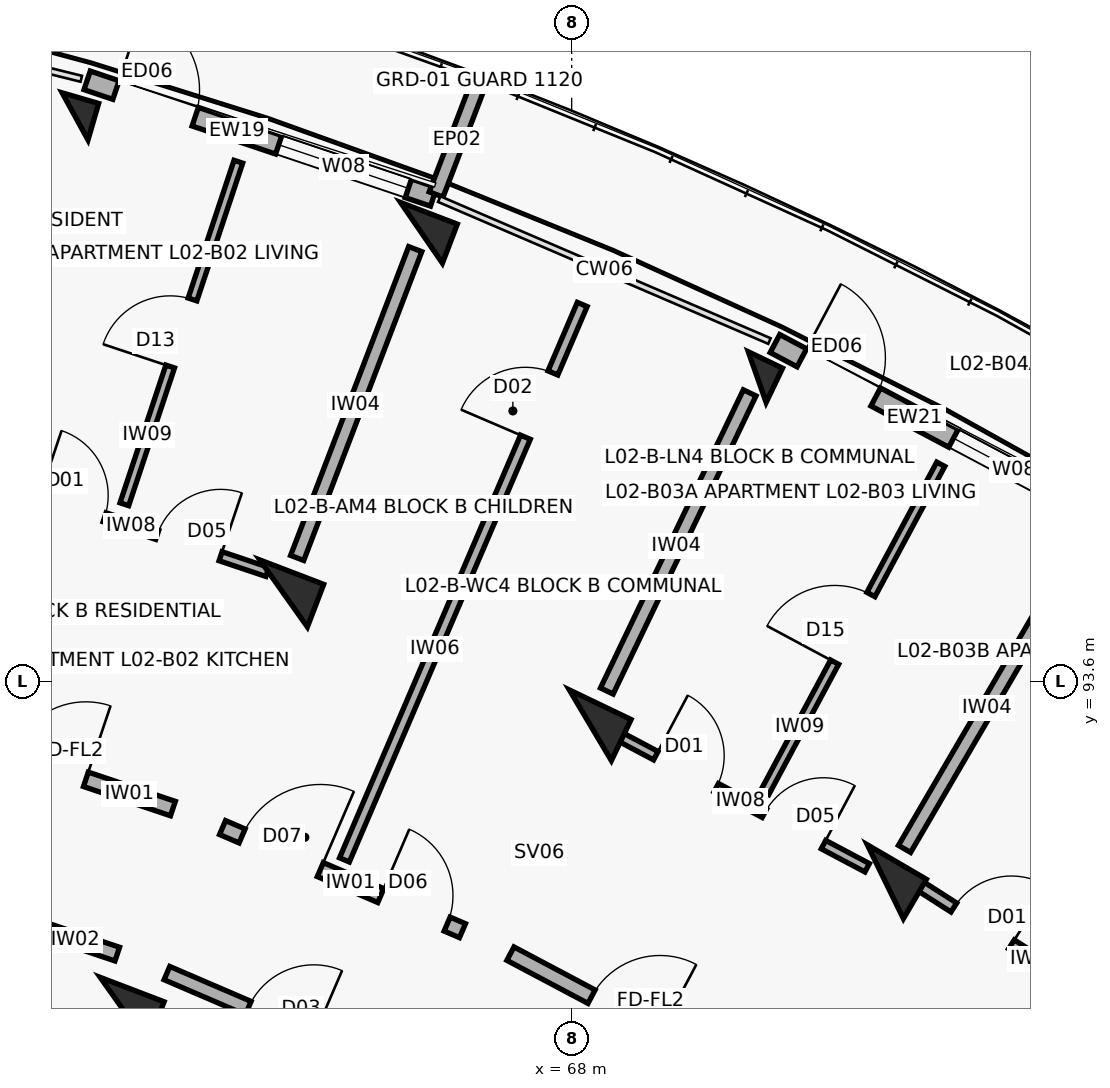
"""IFC4 building model, lengths in metres.
Left out: names, types, materials, properties, quantities, classifications, styles, units other than length and angle.
Written with IfcOpenShell. Run it as: python <this file> out.ifc"""

import sys

from ifc_helpers import new_model, si_unit, direction, frame, frame_2d, origin, origin_2d, place, context, subcontext, project, spatial, rectangle, extrude, element, fill, save


model = new_model("IFC4")
c1 = context("Model", 3, precision=1e-05, world=origin(), true_north=direction((0.0, 1.0)))
c2 = subcontext(c1, "Body", "Model", "MODEL_VIEW")
j1 = project(units=[si_unit("LENGTHUNIT", "METRE"), si_unit("PLANEANGLEUNIT", "RADIAN")], contexts=[c1])
p1 = place(None, origin())
s1 = spatial("IfcSite", under=j1, at=p1, CompositionType="ELEMENT")
p2 = place(p1, origin())
s2 = spatial("IfcBuilding", under=s1, at=p2, CompositionType="ELEMENT")
p3 = place(p2, frame((0.0, 0.0, 8.1)))
s3 = spatial("IfcBuildingStorey", under=s2, at=p3, CompositionType="ELEMENT", Elevation=8.1)
p4 = place(p3, frame((61.467, 101.031, 0.0), z_axis=(0.0, 0.0, 1.0), x_axis=(0.27966144946, 0.96009867914, 0.0)))
e1 = element("IfcColumn", 1, at=p4, inside=s3, PredefinedType="COLUMN", context=c2, shape_type="SweptSolid", body=[
    extrude(rectangle(XDim=0.5, YDim=0.5, at=origin_2d()), origin(), (0.0, 0.0, 1.0), 3.1),
])
for number, where, z_axis, x_axis in (
    (2, (62.111, 89.261, 0.0), (0.0, 0.0, 1.0), (0.357, 0.934, 0.0)),
    (3, (64.21, 94.753, 0.0), (0.0, 0.0, 1.0), (0.357, 0.934, 0.0)),
):
    element("IfcColumn", number, at=place(p3, frame(where, z_axis=z_axis, x_axis=x_axis)), inside=s3, PredefinedType="COLUMN", context=c2, shape_type="SweptSolid", body=[
        extrude(rectangle(XDim=0.6, YDim=0.9, at=origin_2d()), origin(), (0.0, 0.0, 1.0), 3.1),
    ])
p5 = place(p3, frame((66.024, 99.499, 0.0), z_axis=(0.0, 0.0, 1.0), x_axis=(0.357064076459, 0.934079892355, 0.0)))
e4 = element("IfcColumn", 4, at=p5, inside=s3, PredefinedType="COLUMN", context=c2, shape_type="SweptSolid", body=[
    extrude(rectangle(XDim=0.55, YDim=0.8, at=origin_2d()), origin(), (0.0, 0.0, 1.0), 3.1),
])
p6 = place(p3, frame((68.246, 93.019, 0.0), z_axis=(0.0, 0.0, 1.0), x_axis=(0.432085748802, 0.901832526405, 0.0)))
e5 = element("IfcColumn", 5, at=p6, inside=s3, PredefinedType="COLUMN", context=c2, shape_type="SweptSolid", body=[
    extrude(rectangle(XDim=0.6, YDim=0.9, at=origin_2d()), origin(), (0.0, 0.0, 1.0), 3.1),
])
p7 = place(p3, frame((70.441, 97.6, 0.0), z_axis=(0.0, 0.0, 1.0), x_axis=(0.432085748802, 0.901832526405, 0.0)))
e6 = element("IfcColumn", 6, at=p7, inside=s3, PredefinedType="COLUMN", context=c2, shape_type="SweptSolid", body=[
    extrude(rectangle(XDim=0.5, YDim=0.5, at=origin_2d()), origin(), (0.0, 0.0, 1.0), 3.1),
])
p8 = place(p3, frame((72.127, 90.96, 0.0), z_axis=(0.0, 0.0, 1.0), x_axis=(0.504226211181, 0.863571611366, 0.0)))
e7 = element("IfcColumn", 7, at=p8, inside=s3, PredefinedType="COLUMN", context=c2, shape_type="SweptSolid", body=[
    extrude(rectangle(XDim=0.6, YDim=0.9, at=origin_2d()), origin(), (0.0, 0.0, 1.0), 3.1),
])
p9 = place(p3, frame((61.625, 101.504, 0.0), z_axis=(0.0, 0.0, 1.0), x_axis=(0.947867898788, -0.318663531717, 0.0)))
e8 = element("IfcWall", 8, at=p9, inside=s3, PredefinedType="SOLIDWALL", context=c2, shape_type="SweptSolid", body=[
    extrude(rectangle(XDim=4.809, YDim=0.258, at=frame_2d((2.405, 0.0))), origin(), (0.0, 0.0, 1.0), 2.25),
])
p10 = place(p9, frame((0.4, 0.0, 0.0)))
e9 = element("IfcOpeningElement", 9, at=p10, cuts=e8, PredefinedType="OPENING", context=c2, shape_type="SweptSolid", body=[
    extrude(rectangle(XDim=1.1, YDim=2.15, at=frame_2d((0.55, 1.075))), frame((0.0, 0.139, 0.0), z_axis=(0.0, -1.0, 0.0), x_axis=(1.0, 0.0, 0.0)), (0.0, 0.0, 1.0), 0.278),
])
p11 = place(p9, frame((2.659, 0.0, 0.35)))
e10 = element("IfcOpeningElement", 10, at=p11, cuts=e8, PredefinedType="OPENING", context=c2, shape_type="SweptSolid", body=[
    extrude(rectangle(XDim=1.8, YDim=1.65, at=frame_2d((0.9, 0.825))), frame((0.0, 0.139, 0.0), z_axis=(0.0, -1.0, 0.0), x_axis=(1.0, 0.0, 0.0)), (0.0, 0.0, 1.0), 0.278),
])
p12 = place(p3, frame((66.217, 100.003, 0.0), z_axis=(0.0, 0.0, 1.0), x_axis=(0.356957296461, 0.934120703391, 0.0)))
e11 = element("IfcWall", 11, at=p12, inside=s3, PredefinedType="PARAPET", context=c2, shape_type="SweptSolid", body=[
    extrude(rectangle(XDim=1.53, YDim=0.195, at=frame_2d((0.765, 0.0))), origin(), (0.0, 0.0, 1.0), 2.25),
])
p13 = place(p3, frame((70.675, 98.042, 0.0), z_axis=(0.0, 0.0, 1.0), x_axis=(0.883448093208, -0.468529045639, 0.0)))
e12 = element("IfcWall", 12, at=p13, inside=s3, PredefinedType="SOLIDWALL", context=c2, shape_type="SweptSolid", body=[
    extrude(rectangle(XDim=4.809, YDim=0.268, at=frame_2d((2.405, 0.0))), origin(), (0.0, 0.0, 1.0), 2.25),
])
p14 = place(p13, frame((0.4, 0.0, 0.0)))
e13 = element("IfcOpeningElement", 13, at=p14, cuts=e12, PredefinedType="OPENING", context=c2, shape_type="SweptSolid", body=[
    extrude(rectangle(XDim=1.1, YDim=2.15, at=frame_2d((0.55, 1.075))), frame((0.0, 0.144, 0.0), z_axis=(0.0, -1.0, 0.0), x_axis=(1.0, 0.0, 0.0)), (0.0, 0.0, 1.0), 0.288),
])
p15 = place(p13, frame((2.659, 0.0, 0.35)))
e14 = element("IfcOpeningElement", 14, at=p15, cuts=e12, PredefinedType="OPENING", context=c2, shape_type="SweptSolid", body=[
    extrude(rectangle(XDim=1.8, YDim=1.65, at=frame_2d((0.9, 0.825))), frame((0.0, 0.144, 0.0), z_axis=(0.0, -1.0, 0.0), x_axis=(1.0, 0.0, 0.0)), (0.0, 0.0, 1.0), 0.288),
])
p16 = place(p3, frame((59.497, 93.018, 0.0), z_axis=(0.0, 0.0, 1.0), x_axis=(0.947863007629, -0.318678080151, 0.0)))
e15 = element("IfcWall", 15, at=p16, inside=s3, PredefinedType="SOLIDWALL", context=c2, shape_type="SweptSolid", body=[
    extrude(rectangle(XDim=3.436, YDim=0.2, at=frame_2d((1.718, 0.0))), origin(), (0.0, 0.0, 1.0), 2.08),
])
p17 = place(p16, frame((1.208, 0.0, 0.0)))
e16 = element("IfcOpeningElement", 16, at=p17, cuts=e15, PredefinedType="OPENING", context=c2, shape_type="SweptSolid", body=[
    extrude(rectangle(XDim=1.02, YDim=2.15, at=frame_2d((0.51, 1.075))), frame((0.0, 0.11, 0.0), z_axis=(0.0, -1.0, 0.0), x_axis=(1.0, 0.0, 0.0)), (0.0, 0.0, 1.0), 0.22),
])
p18 = place(p3, frame((58.923, 91.049, 0.0), z_axis=(0.0, 0.0, 1.0), x_axis=(0.94787351033, -0.318646839643, 0.0)))
e17 = element("IfcWall", 17, at=p18, inside=s3, PredefinedType="SOLIDWALL", context=c2, shape_type="SweptSolid", body=[
    extrude(rectangle(XDim=3.269, YDim=0.19, at=frame_2d((1.634, 0.0))), origin(), (0.0, 0.0, 1.0), 2.08),
])
p19 = place(p18, frame((1.174, 0.0, 0.0)))
e18 = element("IfcOpeningElement", 18, at=p19, cuts=e17, PredefinedType="OPENING", context=c2, shape_type="SweptSolid", body=[
    extrude(rectangle(XDim=0.92, YDim=2.1, at=frame_2d((0.46, 1.05))), frame((0.0, 0.105, 0.0), z_axis=(0.0, -1.0, 0.0), x_axis=(1.0, 0.0, 0.0)), (0.0, 0.0, 1.0), 0.21),
])
p20 = place(p3, frame((60.386, 96.25, 0.0), z_axis=(0.0, 0.0, 1.0), x_axis=(0.947879193428, -0.318629933725, 0.0)))
e19 = element("IfcWall", 19, at=p20, inside=s3, PredefinedType="PARTITIONING", context=c2, shape_type="SweptSolid", body=[
    extrude(rectangle(XDim=3.81, YDim=0.125, at=frame_2d((1.905, 0.0))), origin(), (0.0, 0.0, 1.0), 2.08),
])
p21 = place(p20, frame((0.65, 0.0, 0.0)))
e20 = element("IfcOpeningElement", 20, at=p21, cuts=e19, PredefinedType="OPENING", context=c2, shape_type="SweptSolid", body=[
    extrude(rectangle(XDim=0.9, YDim=2.1, at=frame_2d((0.45, 1.05))), frame((0.0, 0.073, 0.0), z_axis=(0.0, -1.0, 0.0), x_axis=(1.0, 0.0, 0.0)), (0.0, 0.0, 1.0), 0.145),
])
p22 = place(p20, frame((2.28, 0.0, 0.0)))
e21 = element("IfcOpeningElement", 21, at=p22, cuts=e19, PredefinedType="OPENING", context=c2, shape_type="SweptSolid", body=[
    extrude(rectangle(XDim=0.88, YDim=2.1, at=frame_2d((0.44, 1.05))), frame((0.0, 0.073, 0.0), z_axis=(0.0, -1.0, 0.0), x_axis=(1.0, 0.0, 0.0)), (0.0, 0.0, 1.0), 0.145),
])
p23 = place(p3, frame((62.115, 95.927, 0.0), z_axis=(0.0, 0.0, 1.0), x_axis=(0.31574970662, 0.94884251737, 0.0)))
e22 = element("IfcWall", 22, at=p23, inside=s3, PredefinedType="PARTITIONING", context=c2, shape_type="SweptSolid", body=[
    extrude(rectangle(XDim=4.75, YDim=0.12, at=frame_2d((2.375, 0.0))), origin(), (0.0, 0.0, 1.0), 2.08),
])
p24 = place(p23, frame((1.91, 0.0, 0.0)))
e23 = element("IfcOpeningElement", 23, at=p24, cuts=e22, PredefinedType="OPENING", context=c2, shape_type="SweptSolid", body=[
    extrude(rectangle(XDim=0.93, YDim=2.1, at=frame_2d((0.465, 1.05))), frame((0.0, 0.07, 0.0), z_axis=(0.0, -1.0, 0.0), x_axis=(1.0, 0.0, 0.0)), (0.0, 0.0, 1.0), 0.14),
])
p25 = place(p3, frame((63.407, 91.673, 0.0), z_axis=(0.0, 0.0, 1.0), x_axis=(0.918718172399, -0.394913813008, 0.0)))
e24 = element("IfcWall", 24, at=p25, inside=s3, PredefinedType="SOLIDWALL", context=c2, shape_type="SweptSolid", body=[
    extrude(rectangle(XDim=3.436, YDim=0.2, at=frame_2d((1.718, 0.0))), origin(), (0.0, 0.0, 1.0), 2.08),
])
p26 = place(p25, frame((0.28, 0.0, 0.0)))
e25 = element("IfcOpeningElement", 25, at=p26, cuts=e24, PredefinedType="OPENING", context=c2, shape_type="SweptSolid", body=[
    extrude(rectangle(XDim=1.12, YDim=2.15, at=frame_2d((0.56, 1.075))), frame((0.0, 0.11, 0.0), z_axis=(0.0, -1.0, 0.0), x_axis=(1.0, 0.0, 0.0)), (0.0, 0.0, 1.0), 0.22),
])
p27 = place(p25, frame((2.266, 0.0, 0.0)))
e26 = element("IfcOpeningElement", 26, at=p27, cuts=e24, PredefinedType="OPENING", context=c2, shape_type="SweptSolid", body=[
    extrude(rectangle(XDim=0.95, YDim=2.1, at=frame_2d((0.475, 1.05))), frame((0.0, 0.11, 0.0), z_axis=(0.0, -1.0, 0.0), x_axis=(1.0, 0.0, 0.0)), (0.0, 0.0, 1.0), 0.22),
])
p28 = place(p3, frame((62.675, 89.758, 0.0), z_axis=(0.0, 0.0, 1.0), x_axis=(0.918723391052, -0.394901672235, 0.0)))
e27 = element("IfcWall", 27, at=p28, inside=s3, PredefinedType="SOLIDWALL", context=c2, shape_type="SweptSolid", body=[
    extrude(rectangle(XDim=3.269, YDim=0.19, at=frame_2d((1.634, 0.0))), origin(), (0.0, 0.0, 1.0), 2.08),
])
p29 = place(p28, frame((1.164, 0.0, 0.0)))
e28 = element("IfcOpeningElement", 28, at=p29, cuts=e27, PredefinedType="OPENING", context=c2, shape_type="SweptSolid", body=[
    extrude(rectangle(XDim=0.94, YDim=2.1, at=frame_2d((0.47, 1.05))), frame((0.0, 0.105, 0.0), z_axis=(0.0, -1.0, 0.0), x_axis=(1.0, 0.0, 0.0)), (0.0, 0.0, 1.0), 0.21),
])
p30 = place(p3, frame((65.01, 91.247, 0.0), z_axis=(0.0, 0.0, 1.0), x_axis=(0.393511564709, 0.919319666079, 0.0)))
e29 = element("IfcWall", 29, at=p30, inside=s3, PredefinedType="PARTITIONING", context=c2, shape_type="SweptSolid", body=[
    extrude(rectangle(XDim=7.95, YDim=0.14, at=frame_2d((3.975, 0.0))), origin(), (0.0, 0.0, 1.0), 2.08),
])
p31 = place(p30, frame((6.05, 0.0, 0.0)))
e30 = element("IfcOpeningElement", 30, at=p31, cuts=e29, PredefinedType="OPENING", context=c2, shape_type="SweptSolid", body=[
    extrude(rectangle(XDim=0.92, YDim=2.1, at=frame_2d((0.46, 1.05))), frame((0.0, 0.08, 0.0), z_axis=(0.0, -1.0, 0.0), x_axis=(1.0, 0.0, 0.0)), (0.0, 0.0, 1.0), 0.16),
])
p32 = place(p3, frame((64.389, 95.22, 0.0), z_axis=(0.0, 0.0, 1.0), x_axis=(0.357064016205, 0.934079915388, 0.0)))
e31 = element("IfcWall", 31, at=p32, inside=s3, PredefinedType="SOLIDWALL", context=c2, shape_type="SweptSolid", body=[
    extrude(rectangle(XDim=4.35, YDim=0.185, at=frame_2d((2.175, 0.0))), origin(), (0.0, 0.0, 1.0), 2.08),
])
p33 = place(p3, frame((67.194, 90.014, 0.0), z_axis=(0.0, 0.0, 1.0), x_axis=(0.883410853063, -0.468599258099, 0.0)))
e32 = element("IfcWall", 32, at=p33, inside=s3, PredefinedType="SOLIDWALL", context=c2, shape_type="SweptSolid", body=[
    extrude(rectangle(XDim=3.436, YDim=0.2, at=frame_2d((1.718, 0.0))), origin(), (0.0, 0.0, 1.0), 2.08),
])
p34 = place(p33, frame((1.208, 0.0, 0.0)))
e33 = element("IfcOpeningElement", 33, at=p34, cuts=e32, PredefinedType="OPENING", context=c2, shape_type="SweptSolid", body=[
    extrude(rectangle(XDim=1.02, YDim=2.15, at=frame_2d((0.51, 1.075))), frame((0.0, 0.11, 0.0), z_axis=(0.0, -1.0, 0.0), x_axis=(1.0, 0.0, 0.0)), (0.0, 0.0, 1.0), 0.22),
])
p35 = place(p3, frame((68.533, 92.923, 0.0), z_axis=(0.0, 0.0, 1.0), x_axis=(0.88341855112, -0.46858474531, 0.0)))
e34 = element("IfcWall", 34, at=p35, inside=s3, PredefinedType="PARTITIONING", context=c2, shape_type="SweptSolid", body=[
    extrude(rectangle(XDim=3.797, YDim=0.125, at=frame_2d((1.898, 0.0))), origin(), (0.0, 0.0, 1.0), 2.08),
])
p36 = place(p35, frame((0.65, 0.0, 0.0)))
e35 = element("IfcOpeningElement", 35, at=p36, cuts=e34, PredefinedType="OPENING", context=c2, shape_type="SweptSolid", body=[
    extrude(rectangle(XDim=0.9, YDim=2.1, at=frame_2d((0.45, 1.05))), frame((0.0, 0.073, 0.0), z_axis=(0.0, -1.0, 0.0), x_axis=(1.0, 0.0, 0.0)), (0.0, 0.0, 1.0), 0.145),
])
p37 = place(p35, frame((2.267, 0.0, 0.0)))
e36 = element("IfcOpeningElement", 36, at=p37, cuts=e34, PredefinedType="OPENING", context=c2, shape_type="SweptSolid", body=[
    extrude(rectangle(XDim=0.88, YDim=2.1, at=frame_2d((0.44, 1.05))), frame((0.0, 0.073, 0.0), z_axis=(0.0, -1.0, 0.0), x_axis=(1.0, 0.0, 0.0)), (0.0, 0.0, 1.0), 0.145),
])
p38 = place(p3, frame((70.541, 92.135, 0.0), z_axis=(0.0, 0.0, 1.0), x_axis=(0.472542158723, 0.881308066586, 0.0)))
e37 = element("IfcWall", 37, at=p38, inside=s3, PredefinedType="PARTITIONING", context=c2, shape_type="SweptSolid", body=[
    extrude(rectangle(XDim=4.9, YDim=0.12, at=frame_2d((2.45, 0.0))), origin(), (0.0, 0.0, 1.0), 2.08),
])
p39 = place(p38, frame((1.945, 0.0, 0.0)))
e38 = element("IfcOpeningElement", 38, at=p39, cuts=e37, PredefinedType="OPENING", context=c2, shape_type="SweptSolid", body=[
    extrude(rectangle(XDim=1.01, YDim=2.1, at=frame_2d((0.505, 1.05))), frame((0.0, 0.07, 0.0), z_axis=(0.0, -1.0, 0.0), x_axis=(1.0, 0.0, 0.0)), (0.0, 0.0, 1.0), 0.14),
])
p40 = place(p3, frame((68.462, 93.469, 0.0), z_axis=(0.0, 0.0, 1.0), x_axis=(0.432086898897, 0.901831975371, 0.0)))
e39 = element("IfcWall", 39, at=p40, inside=s3, PredefinedType="SOLIDWALL", context=c2, shape_type="SweptSolid", body=[
    extrude(rectangle(XDim=4.35, YDim=0.185, at=frame_2d((2.175, 0.0))), origin(), (0.0, 0.0, 1.0), 2.08),
])
p41 = place(p3, frame((72.481, 90.971, 0.0), z_axis=(0.0, 0.0, 1.0), x_axis=(0.842238809758, -0.53910461632, 0.0)))
e40 = element("IfcWall", 40, at=p41, inside=s3, PredefinedType="PARTITIONING", context=c2, shape_type="SweptSolid", body=[
    extrude(rectangle(XDim=3.81, YDim=0.14, at=frame_2d((1.905, 0.0))), origin(), (0.0, 0.0, 1.0), 2.08),
])
p42 = place(p41, frame((0.65, 0.0, 0.0)))
e41 = element("IfcOpeningElement", 41, at=p42, cuts=e40, PredefinedType="OPENING", context=c2, shape_type="SweptSolid", body=[
    extrude(rectangle(XDim=0.9, YDim=2.1, at=frame_2d((0.45, 1.05))), frame((0.0, 0.08, 0.0), z_axis=(0.0, -1.0, 0.0), x_axis=(1.0, 0.0, 0.0)), (0.0, 0.0, 1.0), 0.16),
])
p43 = place(p41, frame((2.28, 0.0, 0.0)))
e42 = element("IfcOpeningElement", 42, at=p43, cuts=e40, PredefinedType="OPENING", context=c2, shape_type="SweptSolid", body=[
    extrude(rectangle(XDim=0.88, YDim=2.1, at=frame_2d((0.44, 1.05))), frame((0.0, 0.08, 0.0), z_axis=(0.0, -1.0, 0.0), x_axis=(1.0, 0.0, 0.0)), (0.0, 0.0, 1.0), 0.16),
])
p44 = place(p3, frame((72.379, 91.392, 0.0), z_axis=(0.0, 0.0, 1.0), x_axis=(0.504216452091, 0.863577309475, 0.0)))
e43 = element("IfcWall", 43, at=p44, inside=s3, PredefinedType="SOLIDWALL", context=c2, shape_type="SweptSolid", body=[
    extrude(rectangle(XDim=4.35, YDim=0.185, at=frame_2d((2.175, 0.0))), origin(), (0.0, 0.0, 1.0), 2.08),
])
p45 = place(p10, origin())
e44 = element("IfcDoor", 44, at=p45, inside=s3, OperationType="SINGLE_SWING_LEFT", PredefinedType="DOOR", context=c2, shape_type="SweptSolid", body=[
    extrude(rectangle(XDim=1.1, YDim=2.15, at=frame_2d((0.55, 1.075))), frame((0.0, 0.025, 0.0), z_axis=(0.0, -1.0, 0.0), x_axis=(1.0, 0.0, 0.0)), (0.0, 0.0, 1.0), 0.05),
])
fill(e9, e44)
p46 = place(p11, origin())
e45 = element("IfcWindow", 45, at=p46, inside=s3, PartitioningType="TRIPLE_PANEL_VERTICAL", PredefinedType="WINDOW", context=c2, shape_type="SweptSolid", body=[
    extrude(rectangle(XDim=1.8, YDim=1.65, at=frame_2d((0.9, 0.825))), frame((0.0, 0.03, 0.0), z_axis=(0.0, -1.0, 0.0), x_axis=(1.0, 0.0, 0.0)), (0.0, 0.0, 1.0), 0.06),
])
fill(e10, e45)
p47 = place(p14, origin())
e46 = element("IfcDoor", 46, at=p47, inside=s3, OperationType="SINGLE_SWING_LEFT", PredefinedType="DOOR", context=c2, shape_type="SweptSolid", body=[
    extrude(rectangle(XDim=1.1, YDim=2.15, at=frame_2d((0.55, 1.075))), frame((0.0, 0.025, 0.0), z_axis=(0.0, -1.0, 0.0), x_axis=(1.0, 0.0, 0.0)), (0.0, 0.0, 1.0), 0.05),
])
fill(e13, e46)
p48 = place(p15, origin())
e47 = element("IfcWindow", 47, at=p48, inside=s3, PartitioningType="TRIPLE_PANEL_VERTICAL", PredefinedType="WINDOW", context=c2, shape_type="SweptSolid", body=[
    extrude(rectangle(XDim=1.8, YDim=1.65, at=frame_2d((0.9, 0.825))), frame((0.0, 0.03, 0.0), z_axis=(0.0, -1.0, 0.0), x_axis=(1.0, 0.0, 0.0)), (0.0, 0.0, 1.0), 0.06),
])
fill(e14, e47)
p49 = place(p17, origin())
e48 = element("IfcDoor", 48, at=p49, inside=s3, OperationType="SINGLE_SWING_RIGHT", PredefinedType="DOOR", context=c2, shape_type="SweptSolid", body=[
    extrude(rectangle(XDim=1.02, YDim=2.15, at=frame_2d((0.51, 1.075))), frame((0.0, 0.025, 0.0), z_axis=(0.0, -1.0, 0.0), x_axis=(1.0, 0.0, 0.0)), (0.0, 0.0, 1.0), 0.05),
])
fill(e16, e48)
p50 = place(p21, origin())
e49 = element("IfcDoor", 49, at=p50, inside=s3, OperationType="SINGLE_SWING_LEFT", PredefinedType="DOOR", context=c2, shape_type="SweptSolid", body=[
    extrude(rectangle(XDim=0.9, YDim=2.1, at=frame_2d((0.45, 1.05))), frame((0.0, 0.025, 0.0), z_axis=(0.0, -1.0, 0.0), x_axis=(1.0, 0.0, 0.0)), (0.0, 0.0, 1.0), 0.05),
])
fill(e20, e49)
p51 = place(p22, origin())
e50 = element("IfcDoor", 50, at=p51, inside=s3, OperationType="SINGLE_SWING_RIGHT", PredefinedType="DOOR", context=c2, shape_type="SweptSolid", body=[
    extrude(rectangle(XDim=0.88, YDim=2.1, at=frame_2d((0.44, 1.05))), frame((0.0, 0.025, 0.0), z_axis=(0.0, -1.0, 0.0), x_axis=(1.0, 0.0, 0.0)), (0.0, 0.0, 1.0), 0.05),
])
fill(e21, e50)
p52 = place(p24, origin())
e51 = element("IfcDoor", 51, at=p52, inside=s3, OperationType="SINGLE_SWING_LEFT", PredefinedType="DOOR", context=c2, shape_type="SweptSolid", body=[
    extrude(rectangle(XDim=0.93, YDim=2.1, at=frame_2d((0.465, 1.05))), frame((0.0, 0.025, 0.0), z_axis=(0.0, -1.0, 0.0), x_axis=(1.0, 0.0, 0.0)), (0.0, 0.0, 1.0), 0.05),
])
fill(e23, e51)
p53 = place(p26, origin())
e52 = element("IfcDoor", 52, at=p53, inside=s3, OperationType="SINGLE_SWING_RIGHT", PredefinedType="DOOR", context=c2, shape_type="SweptSolid", body=[
    extrude(rectangle(XDim=1.12, YDim=2.15, at=frame_2d((0.56, 1.075))), frame((0.0, 0.025, 0.0), z_axis=(0.0, -1.0, 0.0), x_axis=(1.0, 0.0, 0.0)), (0.0, 0.0, 1.0), 0.05),
])
fill(e25, e52)
p54 = place(p27, origin())
e53 = element("IfcDoor", 53, at=p54, inside=s3, OperationType="SINGLE_SWING_LEFT", PredefinedType="DOOR", context=c2, shape_type="SweptSolid", body=[
    extrude(rectangle(XDim=0.95, YDim=2.1, at=frame_2d((0.475, 1.05))), frame((0.0, 0.025, 0.0), z_axis=(0.0, -1.0, 0.0), x_axis=(1.0, 0.0, 0.0)), (0.0, 0.0, 1.0), 0.05),
])
fill(e26, e53)
p55 = place(p29, origin())
e54 = element("IfcDoor", 54, at=p55, inside=s3, OperationType="SINGLE_SWING_RIGHT", PredefinedType="DOOR", context=c2, shape_type="SweptSolid", body=[
    extrude(rectangle(XDim=0.94, YDim=2.1, at=frame_2d((0.47, 1.05))), frame((0.0, 0.025, 0.0), z_axis=(0.0, -1.0, 0.0), x_axis=(1.0, 0.0, 0.0)), (0.0, 0.0, 1.0), 0.05),
])
fill(e28, e54)
p56 = place(p31, origin())
e55 = element("IfcDoor", 55, at=p56, inside=s3, OperationType="SINGLE_SWING_LEFT", PredefinedType="DOOR", context=c2, shape_type="SweptSolid", body=[
    extrude(rectangle(XDim=0.92, YDim=2.1, at=frame_2d((0.46, 1.05))), frame((0.0, 0.025, 0.0), z_axis=(0.0, -1.0, 0.0), x_axis=(1.0, 0.0, 0.0)), (0.0, 0.0, 1.0), 0.05),
])
fill(e30, e55)
p57 = place(p34, origin())
e56 = element("IfcDoor", 56, at=p57, inside=s3, OperationType="SINGLE_SWING_RIGHT", PredefinedType="DOOR", context=c2, shape_type="SweptSolid", body=[
    extrude(rectangle(XDim=1.02, YDim=2.15, at=frame_2d((0.51, 1.075))), frame((0.0, 0.025, 0.0), z_axis=(0.0, -1.0, 0.0), x_axis=(1.0, 0.0, 0.0)), (0.0, 0.0, 1.0), 0.05),
])
fill(e33, e56)
p58 = place(p36, origin())
e57 = element("IfcDoor", 57, at=p58, inside=s3, OperationType="SINGLE_SWING_LEFT", PredefinedType="DOOR", context=c2, shape_type="SweptSolid", body=[
    extrude(rectangle(XDim=0.9, YDim=2.1, at=frame_2d((0.45, 1.05))), frame((0.0, 0.025, 0.0), z_axis=(0.0, -1.0, 0.0), x_axis=(1.0, 0.0, 0.0)), (0.0, 0.0, 1.0), 0.05),
])
fill(e35, e57)
p59 = place(p37, origin())
e58 = element("IfcDoor", 58, at=p59, inside=s3, OperationType="SINGLE_SWING_RIGHT", PredefinedType="DOOR", context=c2, shape_type="SweptSolid", body=[
    extrude(rectangle(XDim=0.88, YDim=2.1, at=frame_2d((0.44, 1.05))), frame((0.0, 0.025, 0.0), z_axis=(0.0, -1.0, 0.0), x_axis=(1.0, 0.0, 0.0)), (0.0, 0.0, 1.0), 0.05),
])
fill(e36, e58)
p60 = place(p39, origin())
e59 = element("IfcDoor", 59, at=p60, inside=s3, OperationType="SINGLE_SWING_LEFT", PredefinedType="DOOR", context=c2, shape_type="SweptSolid", body=[
    extrude(rectangle(XDim=1.01, YDim=2.1, at=frame_2d((0.505, 1.05))), frame((0.0, 0.025, 0.0), z_axis=(0.0, -1.0, 0.0), x_axis=(1.0, 0.0, 0.0)), (0.0, 0.0, 1.0), 0.05),
])
fill(e38, e59)
p61 = place(p42, origin())
e60 = element("IfcDoor", 60, at=p61, inside=s3, OperationType="SINGLE_SWING_RIGHT", PredefinedType="DOOR", context=c2, shape_type="SweptSolid", body=[
    extrude(rectangle(XDim=0.9, YDim=2.1, at=frame_2d((0.45, 1.05))), frame((0.0, 0.025, 0.0), z_axis=(0.0, -1.0, 0.0), x_axis=(1.0, 0.0, 0.0)), (0.0, 0.0, 1.0), 0.05),
])
fill(e41, e60)
save(model, sys.argv[1])
